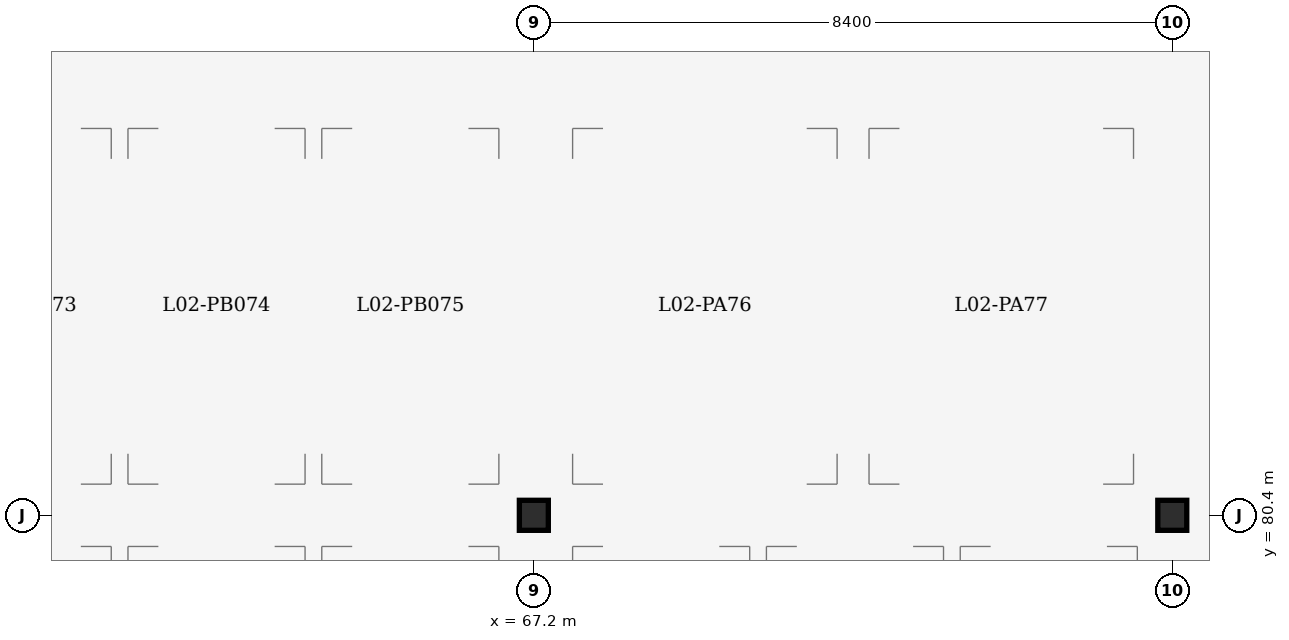
"""IFC4 building model, lengths in metres.
Left out: names, types, materials, properties, quantities, classifications, styles, units other than length and angle.
Written with IfcOpenShell. Run it as: python <this file> out.ifc"""

import sys

from ifc_helpers import new_model, si_unit, direction, frame, origin, origin_2d, place, context, subcontext, project, spatial, i_section, extrude, element, save


model = new_model("IFC4")
c1 = context("Model", 3, precision=1e-05, world=origin(), true_north=direction((0.0, 1.0)))
c2 = subcontext(c1, "Body", "Model", "MODEL_VIEW")
j1 = project(units=[si_unit("LENGTHUNIT", "METRE"), si_unit("PLANEANGLEUNIT", "RADIAN")], contexts=[c1])
p1 = place(None, origin())
s1 = spatial("IfcSite", under=j1, at=p1, CompositionType="ELEMENT")
p2 = place(p1, origin())
s2 = spatial("IfcBuilding", under=s1, at=p2, CompositionType="ELEMENT")
p3 = place(p2, frame((0.0, 0.0, 9.0)))
s3 = spatial("IfcBuildingStorey", under=s2, at=p3, CompositionType="ELEMENT", Elevation=9.0)
for number, where, z_axis, x_axis in (
    (1, (67.2, 80.4, 0.0), (0.0, 0.0, 1.0), (1.0, 0.0, 0.0)),
    (2, (75.6, 80.4, 0.0), (0.0, 0.0, 1.0), (1.0, 0.0, 0.0)),
):
    element("IfcColumn", number, at=place(p3, frame(where, z_axis=z_axis, x_axis=x_axis)), inside=s3, PredefinedType="COLUMN", context=c2, shape_type="SweptSolid", body=[
        extrude(i_section(OverallWidth=0.395, OverallDepth=0.381, WebThickness=0.018, FlangeThickness=0.03, FilletRadius=0.015, at=origin_2d()), origin(), (0.0, 0.0, 1.0), 3.6),
    ])
save(model, sys.argv[1])
